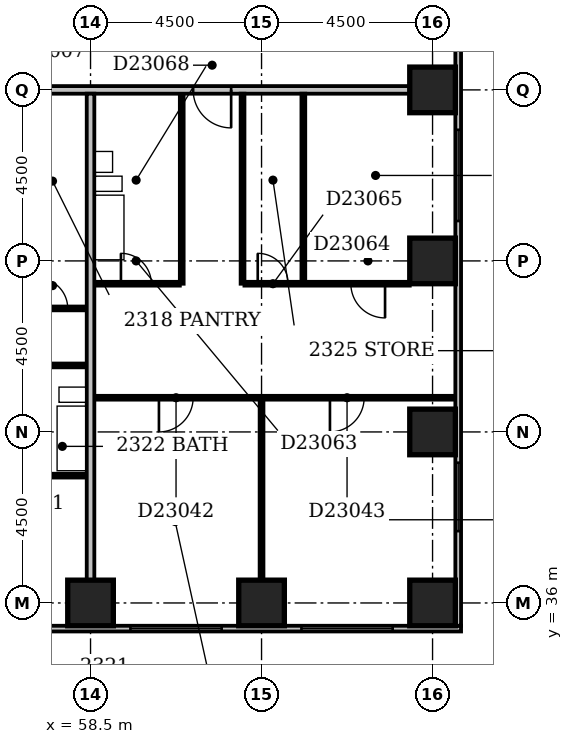
"""IFC4 building model, lengths in metres.
Left out: names, types, materials, properties, quantities, classifications, styles, units other than length and angle.
Written with IfcOpenShell. Run it as: python <this file> out.ifc"""

import sys

from ifc_helpers import new_model, si_unit, direction, frame, frame_2d, origin, origin_2d, place, context, subcontext, project, spatial, rectangle, extrude, element, fill, save


model = new_model("IFC4")
c1 = context("Model", 3, precision=1e-05, world=origin(), true_north=direction((0.0, 1.0)))
c2 = subcontext(c1, "Body", "Model", "MODEL_VIEW")
j1 = project(units=[si_unit("LENGTHUNIT", "METRE"), si_unit("PLANEANGLEUNIT", "RADIAN")], contexts=[c1])
p1 = place(None, origin())
s1 = spatial("IfcSite", under=j1, at=p1, CompositionType="ELEMENT")
p2 = place(p1, origin())
s2 = spatial("IfcBuilding", under=s1, at=p2, CompositionType="ELEMENT")
p3 = place(p2, frame((0.0, 0.0, 93.8)))
s3 = spatial("IfcBuildingStorey", under=s2, at=p3, CompositionType="ELEMENT", Elevation=93.8)
for number, where, z_axis, x_axis in (
    (1, (58.5, 36.0, -0.3), (0.0, 0.0, 1.0), (1.0, 0.0, 0.0)),
    (2, (63.0, 36.0, -0.3), (0.0, 0.0, 1.0), (1.0, 0.0, 0.0)),
    (3, (67.5, 36.0, -0.3), (0.0, 0.0, 1.0), (1.0, 0.0, 0.0)),
    (4, (67.5, 40.5, -0.3), (0.0, 0.0, 1.0), (1.0, 0.0, 0.0)),
    (5, (67.5, 45.0, -0.3), (0.0, 0.0, 1.0), (1.0, 0.0, 0.0)),
    (6, (67.5, 49.5, -0.3), (0.0, 0.0, 1.0), (1.0, 0.0, 0.0)),
):
    element("IfcColumn", number, at=place(p3, frame(where, z_axis=z_axis, x_axis=x_axis)), inside=s3, PredefinedType="COLUMN", context=c2, shape_type="SweptSolid", body=[
        extrude(rectangle(XDim=1.2, YDim=1.2, at=origin_2d()), origin(), (0.0, 0.0, 1.0), 3.6),
    ])
p4 = place(p3, frame((23.1, 35.325, 0.0), z_axis=(0.0, 0.0, 1.0), x_axis=(1.0, 0.0, 0.0)))
e7 = element("IfcWall", 7, at=p4, inside=s3, PredefinedType="STANDARD", context=c2, shape_type="SweptSolid", body=[
    extrude(rectangle(XDim=45.15, YDim=0.15, at=frame_2d((22.575, 0.0))), origin(), (0.0, 0.0, 1.0), 2.7),
])
p5 = place(p4, frame((2.185, 0.0, 0.6)))
e8 = element("IfcOpeningElement", 8, at=p5, cuts=e7, PredefinedType="OPENING", context=c2, shape_type="SweptSolid", body=[
    extrude(rectangle(XDim=0.9, YDim=1.8, at=frame_2d((0.45, 0.9))), frame((0.0, 0.087, 0.0), z_axis=(0.0, -1.0, 0.0), x_axis=(1.0, 0.0, 0.0)), (0.0, 0.0, 1.0), 0.174),
])
p6 = place(p4, frame((4.95, 0.0, 0.6)))
e9 = element("IfcOpeningElement", 9, at=p6, cuts=e7, PredefinedType="OPENING", context=c2, shape_type="SweptSolid", body=[
    extrude(rectangle(XDim=2.4, YDim=1.8, at=frame_2d((1.2, 0.9))), frame((0.0, 0.087, 0.0), z_axis=(0.0, -1.0, 0.0), x_axis=(1.0, 0.0, 0.0)), (0.0, 0.0, 1.0), 0.174),
])
p7 = place(p4, frame((9.45, 0.0, 0.6)))
e10 = element("IfcOpeningElement", 10, at=p7, cuts=e7, PredefinedType="OPENING", context=c2, shape_type="SweptSolid", body=[
    extrude(rectangle(XDim=2.4, YDim=1.8, at=frame_2d((1.2, 0.9))), frame((0.0, 0.087, 0.0), z_axis=(0.0, -1.0, 0.0), x_axis=(1.0, 0.0, 0.0)), (0.0, 0.0, 1.0), 0.174),
])
p8 = place(p4, frame((13.95, 0.0, 0.6)))
e11 = element("IfcOpeningElement", 11, at=p8, cuts=e7, PredefinedType="OPENING", context=c2, shape_type="SweptSolid", body=[
    extrude(rectangle(XDim=2.4, YDim=1.8, at=frame_2d((1.2, 0.9))), frame((0.0, 0.087, 0.0), z_axis=(0.0, -1.0, 0.0), x_axis=(1.0, 0.0, 0.0)), (0.0, 0.0, 1.0), 0.174),
])
p9 = place(p4, frame((18.45, 0.0, 0.6)))
e12 = element("IfcOpeningElement", 12, at=p9, cuts=e7, PredefinedType="OPENING", context=c2, shape_type="SweptSolid", body=[
    extrude(rectangle(XDim=2.4, YDim=1.8, at=frame_2d((1.2, 0.9))), frame((0.0, 0.087, 0.0), z_axis=(0.0, -1.0, 0.0), x_axis=(1.0, 0.0, 0.0)), (0.0, 0.0, 1.0), 0.174),
])
p10 = place(p4, frame((22.71, 0.0, 0.6)))
e13 = element("IfcOpeningElement", 13, at=p10, cuts=e7, PredefinedType="OPENING", context=c2, shape_type="SweptSolid", body=[
    extrude(rectangle(XDim=1.8, YDim=1.8, at=frame_2d((0.9, 0.9))), frame((0.0, 0.087, 0.0), z_axis=(0.0, -1.0, 0.0), x_axis=(1.0, 0.0, 0.0)), (0.0, 0.0, 1.0), 0.174),
])
p11 = place(p4, frame((28.859, 0.0, 0.6)))
e14 = element("IfcOpeningElement", 14, at=p11, cuts=e7, PredefinedType="OPENING", context=c2, shape_type="SweptSolid", body=[
    extrude(rectangle(XDim=1.2, YDim=1.8, at=frame_2d((0.6, 0.9))), frame((0.0, 0.087, 0.0), z_axis=(0.0, -1.0, 0.0), x_axis=(1.0, 0.0, 0.0)), (0.0, 0.0, 1.0), 0.174),
])
p12 = place(p4, frame((31.95, 0.0, 0.6)))
e15 = element("IfcOpeningElement", 15, at=p12, cuts=e7, PredefinedType="OPENING", context=c2, shape_type="SweptSolid", body=[
    extrude(rectangle(XDim=2.4, YDim=1.8, at=frame_2d((1.2, 0.9))), frame((0.0, 0.087, 0.0), z_axis=(0.0, -1.0, 0.0), x_axis=(1.0, 0.0, 0.0)), (0.0, 0.0, 1.0), 0.174),
])
p13 = place(p4, frame((36.45, 0.0, 0.6)))
e16 = element("IfcOpeningElement", 16, at=p13, cuts=e7, PredefinedType="OPENING", context=c2, shape_type="SweptSolid", body=[
    extrude(rectangle(XDim=2.4, YDim=1.8, at=frame_2d((1.2, 0.9))), frame((0.0, 0.087, 0.0), z_axis=(0.0, -1.0, 0.0), x_axis=(1.0, 0.0, 0.0)), (0.0, 0.0, 1.0), 0.174),
])
p14 = place(p4, frame((40.95, 0.0, 0.6)))
e17 = element("IfcOpeningElement", 17, at=p14, cuts=e7, PredefinedType="OPENING", context=c2, shape_type="SweptSolid", body=[
    extrude(rectangle(XDim=2.4, YDim=1.8, at=frame_2d((1.2, 0.9))), frame((0.0, 0.087, 0.0), z_axis=(0.0, -1.0, 0.0), x_axis=(1.0, 0.0, 0.0)), (0.0, 0.0, 1.0), 0.174),
])
p15 = place(p3, frame((68.175, 35.4, 0.0), z_axis=(0.0, 0.0, 1.0), x_axis=(0.0, 1.0, 0.0)))
e18 = element("IfcWall", 18, at=p15, inside=s3, PredefinedType="STANDARD", context=c2, shape_type="SweptSolid", body=[
    extrude(rectangle(XDim=23.85, YDim=0.15, at=frame_2d((11.925, 0.0))), origin(), (0.0, 0.0, 1.0), 2.7),
])
p16 = place(p15, frame((2.49, 0.0, 0.6)))
e19 = element("IfcOpeningElement", 19, at=p16, cuts=e18, PredefinedType="OPENING", context=c2, shape_type="SweptSolid", body=[
    extrude(rectangle(XDim=1.8, YDim=1.8, at=frame_2d((0.9, 0.9))), frame((0.0, 0.087, 0.0), z_axis=(0.0, -1.0, 0.0), x_axis=(1.0, 0.0, 0.0)), (0.0, 0.0, 1.0), 0.174),
])
p17 = place(p15, frame((10.65, 0.0, 0.6)))
e20 = element("IfcOpeningElement", 20, at=p17, cuts=e18, PredefinedType="OPENING", context=c2, shape_type="SweptSolid", body=[
    extrude(rectangle(XDim=2.4, YDim=1.8, at=frame_2d((1.2, 0.9))), frame((0.0, 0.087, 0.0), z_axis=(0.0, -1.0, 0.0), x_axis=(1.0, 0.0, 0.0)), (0.0, 0.0, 1.0), 0.174),
])
p18 = place(p15, frame((19.526, 0.0, 0.6)))
e21 = element("IfcOpeningElement", 21, at=p18, cuts=e18, PredefinedType="OPENING", context=c2, shape_type="SweptSolid", body=[
    extrude(rectangle(XDim=2.1, YDim=1.8, at=frame_2d((1.05, 0.9))), frame((0.0, 0.087, 0.0), z_axis=(0.0, -1.0, 0.0), x_axis=(1.0, 0.0, 0.0)), (0.0, 0.0, 1.0), 0.174),
])
p19 = place(p3, frame((58.5, 36.6, 0.0), z_axis=(0.0, 0.0, 1.0), x_axis=(0.0, 1.0, 0.0)))
e22 = element("IfcWall", 22, at=p19, inside=s3, PredefinedType="PARTITIONING", context=c2, shape_type="SweptSolid", body=[
    extrude(rectangle(XDim=12.8, YDim=0.2, at=frame_2d((6.4, 0.0))), origin(), (0.0, 0.0, 1.0), 3.3),
])
p20 = place(p3, frame((63.0, 36.6, 0.0), z_axis=(0.0, 0.0, 1.0), x_axis=(0.0, 1.0, 0.0)))
e23 = element("IfcWall", 23, at=p20, inside=s3, PredefinedType="PARTITIONING", context=c2, shape_type="SweptSolid", body=[
    extrude(rectangle(XDim=4.75, YDim=0.1, at=frame_2d((2.375, 0.0))), origin(), (0.0, 0.0, 1.0), 2.4),
])
p21 = place(p3, frame((56.25, 39.35, 0.0), z_axis=(0.0, 0.0, 1.0), x_axis=(1.0, 0.0, 0.0)))
e24 = element("IfcWall", 24, at=p21, inside=s3, PredefinedType="PLUMBINGWALL", context=c2, shape_type="SweptSolid", body=[
    extrude(rectangle(XDim=2.15, YDim=0.1, at=frame_2d((1.075, 0.0))), origin(), (0.0, 0.0, 1.0), 3.3),
])
p22 = place(p3, frame((58.6, 41.4, 0.0), z_axis=(0.0, 0.0, 1.0), x_axis=(1.0, 0.0, 0.0)))
e25 = element("IfcWall", 25, at=p22, inside=s3, PredefinedType="PARTITIONING", context=c2, shape_type="SweptSolid", body=[
    extrude(rectangle(XDim=9.5, YDim=0.1, at=frame_2d((4.75, 0.0))), origin(), (0.0, 0.0, 1.0), 3.3),
])
p23 = place(p22, frame((1.7, 0.0, 0.0)))
e26 = element("IfcOpeningElement", 26, at=p23, cuts=e25, PredefinedType="OPENING", context=c2, shape_type="SweptSolid", body=[
    extrude(rectangle(XDim=0.9, YDim=2.1, at=frame_2d((0.45, 1.05))), frame((0.0, 0.062, 0.0), z_axis=(0.0, -1.0, 0.0), x_axis=(1.0, 0.0, 0.0)), (0.0, 0.0, 1.0), 0.124),
])
p24 = place(p22, frame((6.2, 0.0, 0.0)))
e27 = element("IfcOpeningElement", 27, at=p24, cuts=e25, PredefinedType="OPENING", context=c2, shape_type="SweptSolid", body=[
    extrude(rectangle(XDim=0.9, YDim=2.1, at=frame_2d((0.45, 1.05))), frame((0.0, 0.062, 0.0), z_axis=(0.0, -1.0, 0.0), x_axis=(1.0, 0.0, 0.0)), (0.0, 0.0, 1.0), 0.124),
])
p25 = place(p3, frame((40.6, 42.25, 0.0), z_axis=(0.0, 0.0, 1.0), x_axis=(1.0, 0.0, 0.0)))
e28 = element("IfcWall", 28, at=p25, inside=s3, PredefinedType="PARTITIONING", context=c2, shape_type="SweptSolid", body=[
    extrude(rectangle(XDim=17.8, YDim=0.1, at=frame_2d((8.9, 0.0))), origin(), (0.0, 0.0, 1.0), 3.3),
])
p26 = place(p25, frame((3.9, 0.0, 0.0)))
e29 = element("IfcOpeningElement", 29, at=p26, cuts=e28, PredefinedType="OPENING", context=c2, shape_type="SweptSolid", body=[
    extrude(rectangle(XDim=0.9, YDim=2.1, at=frame_2d((0.45, 1.05))), frame((0.0, 0.062, 0.0), z_axis=(0.0, -1.0, 0.0), x_axis=(1.0, 0.0, 0.0)), (0.0, 0.0, 1.0), 0.124),
])
p27 = place(p25, frame((10.7, 0.0, 0.0)))
e30 = element("IfcOpeningElement", 30, at=p27, cuts=e28, PredefinedType="OPENING", context=c2, shape_type="SweptSolid", body=[
    extrude(rectangle(XDim=0.9, YDim=2.1, at=frame_2d((0.45, 1.05))), frame((0.0, 0.062, 0.0), z_axis=(0.0, -1.0, 0.0), x_axis=(1.0, 0.0, 0.0)), (0.0, 0.0, 1.0), 0.124),
])
p28 = place(p25, frame((14.05, 0.0, 0.0)))
e31 = element("IfcOpeningElement", 31, at=p28, cuts=e28, PredefinedType="OPENING", context=c2, shape_type="SweptSolid", body=[
    extrude(rectangle(XDim=0.9, YDim=2.1, at=frame_2d((0.45, 1.05))), frame((0.0, 0.062, 0.0), z_axis=(0.0, -1.0, 0.0), x_axis=(1.0, 0.0, 0.0)), (0.0, 0.0, 1.0), 0.124),
])
p29 = place(p3, frame((49.05, 43.75, 0.0), z_axis=(0.0, 0.0, 1.0), x_axis=(1.0, 0.0, 0.0)))
e32 = element("IfcWall", 32, at=p29, inside=s3, PredefinedType="PARTITIONING", context=c2, shape_type="SweptSolid", body=[
    extrude(rectangle(XDim=9.35, YDim=0.1, at=frame_2d((4.675, 0.0))), origin(), (0.0, 0.0, 1.0), 3.3),
])
p30 = place(p29, frame((0.75, 0.0, 0.0)))
e33 = element("IfcOpeningElement", 33, at=p30, cuts=e32, PredefinedType="OPENING", context=c2, shape_type="SweptSolid", body=[
    extrude(rectangle(XDim=0.8, YDim=2.1, at=frame_2d((0.4, 1.05))), frame((0.0, 0.062, 0.0), z_axis=(0.0, -1.0, 0.0), x_axis=(1.0, 0.0, 0.0)), (0.0, 0.0, 1.0), 0.124),
])
p31 = place(p29, frame((8.05, 0.0, 0.0)))
e34 = element("IfcOpeningElement", 34, at=p31, cuts=e32, PredefinedType="OPENING", context=c2, shape_type="SweptSolid", body=[
    extrude(rectangle(XDim=0.8, YDim=2.1, at=frame_2d((0.4, 1.05))), frame((0.0, 0.062, 0.0), z_axis=(0.0, -1.0, 0.0), x_axis=(1.0, 0.0, 0.0)), (0.0, 0.0, 1.0), 0.124),
])
p32 = place(p29, frame((4.25, 0.0, 0.0)))
e35 = element("IfcOpeningElement", 35, at=p32, cuts=e32, PredefinedType="OPENING", context=c2, shape_type="SweptSolid", body=[
    extrude(rectangle(XDim=0.8, YDim=2.1, at=frame_2d((0.4, 1.05))), frame((0.0, 0.062, 0.0), z_axis=(0.0, -1.0, 0.0), x_axis=(1.0, 0.0, 0.0)), (0.0, 0.0, 1.0), 0.124),
])
p33 = place(p29, frame((6.05, 0.0, 0.0)))
e36 = element("IfcOpeningElement", 36, at=p33, cuts=e32, PredefinedType="OPENING", context=c2, shape_type="SweptSolid", body=[
    extrude(rectangle(XDim=0.8, YDim=2.1, at=frame_2d((0.4, 1.05))), frame((0.0, 0.062, 0.0), z_axis=(0.0, -1.0, 0.0), x_axis=(1.0, 0.0, 0.0)), (0.0, 0.0, 1.0), 0.124),
])
p34 = place(p29, frame((2.7, 0.0, 0.0)))
e37 = element("IfcOpeningElement", 37, at=p34, cuts=e32, PredefinedType="OPENING", context=c2, shape_type="SweptSolid", body=[
    extrude(rectangle(XDim=0.8, YDim=2.1, at=frame_2d((0.4, 1.05))), frame((0.0, 0.062, 0.0), z_axis=(0.0, -1.0, 0.0), x_axis=(1.0, 0.0, 0.0)), (0.0, 0.0, 1.0), 0.124),
])
p35 = place(p3, frame((58.6, 44.4, 0.0), z_axis=(0.0, 0.0, 1.0), x_axis=(1.0, 0.0, 0.0)))
e38 = element("IfcWall", 38, at=p35, inside=s3, PredefinedType="PARTITIONING", context=c2, shape_type="SweptSolid", body=[
    extrude(rectangle(XDim=2.25, YDim=0.1, at=frame_2d((1.125, 0.0))), origin(), (0.0, 0.0, 1.0), 3.3),
])
p36 = place(p35, frame((0.7, 0.0, 0.0)))
e39 = element("IfcOpeningElement", 39, at=p36, cuts=e38, PredefinedType="OPENING", context=c2, shape_type="SweptSolid", body=[
    extrude(rectangle(XDim=0.8, YDim=2.1, at=frame_2d((0.4, 1.05))), frame((0.0, 0.062, 0.0), z_axis=(0.0, -1.0, 0.0), x_axis=(1.0, 0.0, 0.0)), (0.0, 0.0, 1.0), 0.124),
])
p37 = place(p3, frame((60.9, 44.4, 0.0), z_axis=(0.0, 0.0, 1.0), x_axis=(0.0, 1.0, 0.0)))
e40 = element("IfcWall", 40, at=p37, inside=s3, PredefinedType="PLUMBINGWALL", context=c2, shape_type="SweptSolid", body=[
    extrude(rectangle(XDim=5.0, YDim=0.1, at=frame_2d((2.5, 0.0))), origin(), (0.0, 0.0, 1.0), 3.3),
])
p38 = place(p3, frame((62.5, 44.4, 0.0), z_axis=(0.0, 0.0, 1.0), x_axis=(0.0, 1.0, 0.0)))
e41 = element("IfcWall", 41, at=p38, inside=s3, PredefinedType="PARTITIONING", context=c2, shape_type="SweptSolid", body=[
    extrude(rectangle(XDim=5.0, YDim=0.1, at=frame_2d((2.5, 0.0))), origin(), (0.0, 0.0, 1.0), 2.4),
])
p39 = place(p3, frame((62.55, 44.4, 0.0), z_axis=(0.0, 0.0, 1.0), x_axis=(1.0, 0.0, 0.0)))
e42 = element("IfcWall", 42, at=p39, inside=s3, PredefinedType="PARTITIONING", context=c2, shape_type="SweptSolid", body=[
    extrude(rectangle(XDim=4.35, YDim=0.1, at=frame_2d((2.175, 0.0))), origin(), (0.0, 0.0, 1.0), 3.3),
])
p40 = place(p39, frame((2.8, 0.0, 0.0)))
e43 = element("IfcOpeningElement", 43, at=p40, cuts=e42, PredefinedType="OPENING", context=c2, shape_type="SweptSolid", body=[
    extrude(rectangle(XDim=0.9, YDim=2.1, at=frame_2d((0.45, 1.05))), frame((0.0, 0.062, 0.0), z_axis=(0.0, -1.0, 0.0), x_axis=(1.0, 0.0, 0.0)), (0.0, 0.0, 1.0), 0.124),
])
p41 = place(p39, frame((0.35, 0.0, 0.0)))
e44 = element("IfcOpeningElement", 44, at=p41, cuts=e42, PredefinedType="OPENING", context=c2, shape_type="SweptSolid", body=[
    extrude(rectangle(XDim=0.8, YDim=2.1, at=frame_2d((0.4, 1.05))), frame((0.0, 0.062, 0.0), z_axis=(0.0, -1.0, 0.0), x_axis=(1.0, 0.0, 0.0)), (0.0, 0.0, 1.0), 0.124),
])
p42 = place(p3, frame((64.1, 44.45, 0.0), z_axis=(0.0, 0.0, 1.0), x_axis=(0.0, 1.0, 0.0)))
e45 = element("IfcWall", 45, at=p42, inside=s3, PredefinedType="PARTITIONING", context=c2, shape_type="SweptSolid", body=[
    extrude(rectangle(XDim=4.95, YDim=0.1, at=frame_2d((2.475, 0.0))), origin(), (0.0, 0.0, 1.0), 3.3),
])
p43 = place(p3, frame((9.1, 49.5, 0.0), z_axis=(0.0, 0.0, 1.0), x_axis=(1.0, 0.0, 0.0)))
e46 = element("IfcWall", 46, at=p43, inside=s3, PredefinedType="PARTITIONING", context=c2, shape_type="SweptSolid", body=[
    extrude(rectangle(XDim=57.8, YDim=0.2, at=frame_2d((28.9, 0.0))), origin(), (0.0, 0.0, 1.0), 3.3),
])
p44 = place(p43, frame((13.7, 0.0, 0.0)))
e47 = element("IfcOpeningElement", 47, at=p44, cuts=e46, PredefinedType="OPENING", context=c2, shape_type="SweptSolid", body=[
    extrude(rectangle(XDim=1.0, YDim=2.1, at=frame_2d((0.5, 1.05))), frame((0.0, 0.112, 0.0), z_axis=(0.0, -1.0, 0.0), x_axis=(1.0, 0.0, 0.0)), (0.0, 0.0, 1.0), 0.224),
])
p45 = place(p43, frame((38.6, 0.0, 0.0)))
e48 = element("IfcOpeningElement", 48, at=p45, cuts=e46, PredefinedType="OPENING", context=c2, shape_type="SweptSolid", body=[
    extrude(rectangle(XDim=1.0, YDim=2.1, at=frame_2d((0.5, 1.05))), frame((0.0, 0.112, 0.0), z_axis=(0.0, -1.0, 0.0), x_axis=(1.0, 0.0, 0.0)), (0.0, 0.0, 1.0), 0.224),
])
p46 = place(p43, frame((52.1, 0.0, 0.0)))
e49 = element("IfcOpeningElement", 49, at=p46, cuts=e46, PredefinedType="OPENING", context=c2, shape_type="SweptSolid", body=[
    extrude(rectangle(XDim=1.0, YDim=2.1, at=frame_2d((0.5, 1.05))), frame((0.0, 0.112, 0.0), z_axis=(0.0, -1.0, 0.0), x_axis=(1.0, 0.0, 0.0)), (0.0, 0.0, 1.0), 0.224),
])
p47 = place(p43, frame((6.15, 0.0, 0.0)))
e50 = element("IfcOpeningElement", 50, at=p47, cuts=e46, PredefinedType="OPENING", context=c2, shape_type="SweptSolid", body=[
    extrude(rectangle(XDim=0.9, YDim=2.1, at=frame_2d((0.45, 1.05))), frame((0.0, 0.112, 0.0), z_axis=(0.0, -1.0, 0.0), x_axis=(1.0, 0.0, 0.0)), (0.0, 0.0, 1.0), 0.224),
])
p48 = place(p43, frame((10.65, 0.0, 0.0)))
e51 = element("IfcOpeningElement", 51, at=p48, cuts=e46, PredefinedType="OPENING", context=c2, shape_type="SweptSolid", body=[
    extrude(rectangle(XDim=0.9, YDim=2.1, at=frame_2d((0.45, 1.05))), frame((0.0, 0.112, 0.0), z_axis=(0.0, -1.0, 0.0), x_axis=(1.0, 0.0, 0.0)), (0.0, 0.0, 1.0), 0.224),
])
p49 = place(p13, origin())
e52 = element("IfcWindow", 52, at=p49, inside=s3, PartitioningType="SINGLE_PANEL", PredefinedType="WINDOW", context=c2, shape_type="SweptSolid", body=[
    extrude(rectangle(XDim=2.4, YDim=1.8, at=frame_2d((1.2, 0.9))), frame((0.0, 0.03, 0.0), z_axis=(0.0, -1.0, 0.0), x_axis=(1.0, 0.0, 0.0)), (0.0, 0.0, 1.0), 0.06),
])
fill(e16, e52)
p50 = place(p14, origin())
e53 = element("IfcWindow", 53, at=p50, inside=s3, PartitioningType="SINGLE_PANEL", PredefinedType="WINDOW", context=c2, shape_type="SweptSolid", body=[
    extrude(rectangle(XDim=2.4, YDim=1.8, at=frame_2d((1.2, 0.9))), frame((0.0, 0.03, 0.0), z_axis=(0.0, -1.0, 0.0), x_axis=(1.0, 0.0, 0.0)), (0.0, 0.0, 1.0), 0.06),
])
fill(e17, e53)
p51 = place(p16, origin())
e54 = element("IfcWindow", 54, at=p51, inside=s3, PartitioningType="SINGLE_PANEL", PredefinedType="WINDOW", context=c2, shape_type="SweptSolid", body=[
    extrude(rectangle(XDim=1.8, YDim=1.8, at=frame_2d((0.9, 0.9))), frame((0.0, 0.03, 0.0), z_axis=(0.0, -1.0, 0.0), x_axis=(1.0, 0.0, 0.0)), (0.0, 0.0, 1.0), 0.06),
])
fill(e19, e54)
p52 = place(p17, origin())
e55 = element("IfcWindow", 55, at=p52, inside=s3, PartitioningType="SINGLE_PANEL", PredefinedType="WINDOW", context=c2, shape_type="SweptSolid", body=[
    extrude(rectangle(XDim=2.4, YDim=1.8, at=frame_2d((1.2, 0.9))), frame((0.0, 0.03, 0.0), z_axis=(0.0, -1.0, 0.0), x_axis=(1.0, 0.0, 0.0)), (0.0, 0.0, 1.0), 0.06),
])
fill(e20, e55)
p53 = place(p23, frame((0.9, 0.0, 0.0), z_axis=(0.0, 0.0, 1.0), x_axis=(-1.0, 0.0, 0.0)))
e56 = element("IfcDoor", 56, at=p53, inside=s3, OperationType="SINGLE_SWING_RIGHT", PredefinedType="DOOR", context=c2, shape_type="SweptSolid", body=[
    extrude(rectangle(XDim=0.9, YDim=2.1, at=frame_2d((0.45, 1.05))), frame((0.0, 0.025, 0.0), z_axis=(0.0, -1.0, 0.0), x_axis=(1.0, 0.0, 0.0)), (0.0, 0.0, 1.0), 0.05),
])
fill(e26, e56)
p54 = place(p24, frame((0.9, 0.0, 0.0), z_axis=(0.0, 0.0, 1.0), x_axis=(-1.0, 0.0, 0.0)))
e57 = element("IfcDoor", 57, at=p54, inside=s3, OperationType="SINGLE_SWING_RIGHT", PredefinedType="DOOR", context=c2, shape_type="SweptSolid", body=[
    extrude(rectangle(XDim=0.9, YDim=2.1, at=frame_2d((0.45, 1.05))), frame((0.0, 0.025, 0.0), z_axis=(0.0, -1.0, 0.0), x_axis=(1.0, 0.0, 0.0)), (0.0, 0.0, 1.0), 0.05),
])
fill(e27, e57)
p55 = place(p31, origin())
e58 = element("IfcDoor", 58, at=p55, inside=s3, OperationType="SINGLE_SWING_LEFT", PredefinedType="DOOR", context=c2, shape_type="SweptSolid", body=[
    extrude(rectangle(XDim=0.8, YDim=2.1, at=frame_2d((0.4, 1.05))), frame((0.0, 0.025, 0.0), z_axis=(0.0, -1.0, 0.0), x_axis=(1.0, 0.0, 0.0)), (0.0, 0.0, 1.0), 0.05),
])
fill(e34, e58)
p56 = place(p36, origin())
e59 = element("IfcDoor", 59, at=p56, inside=s3, OperationType="SINGLE_SWING_LEFT", PredefinedType="DOOR", context=c2, shape_type="SweptSolid", body=[
    extrude(rectangle(XDim=0.8, YDim=2.1, at=frame_2d((0.4, 1.05))), frame((0.0, 0.025, 0.0), z_axis=(0.0, -1.0, 0.0), x_axis=(1.0, 0.0, 0.0)), (0.0, 0.0, 1.0), 0.05),
])
fill(e39, e59)
p57 = place(p40, origin())
e60 = element("IfcDoor", 60, at=p57, inside=s3, OperationType="SINGLE_SWING_RIGHT", PredefinedType="DOOR", context=c2, shape_type="SweptSolid", body=[
    extrude(rectangle(XDim=0.9, YDim=2.1, at=frame_2d((0.45, 1.05))), frame((0.0, 0.025, 0.0), z_axis=(0.0, -1.0, 0.0), x_axis=(1.0, 0.0, 0.0)), (0.0, 0.0, 1.0), 0.05),
])
fill(e43, e60)
p58 = place(p41, origin())
e61 = element("IfcDoor", 61, at=p58, inside=s3, OperationType="SINGLE_SWING_LEFT", PredefinedType="DOOR", context=c2, shape_type="SweptSolid", body=[
    extrude(rectangle(XDim=0.8, YDim=2.1, at=frame_2d((0.4, 1.05))), frame((0.0, 0.025, 0.0), z_axis=(0.0, -1.0, 0.0), x_axis=(1.0, 0.0, 0.0)), (0.0, 0.0, 1.0), 0.05),
])
fill(e44, e61)
p59 = place(p46, origin())
e62 = element("IfcDoor", 62, at=p59, inside=s3, OperationType="SINGLE_SWING_RIGHT", PredefinedType="DOOR", context=c2, shape_type="SweptSolid", body=[
    extrude(rectangle(XDim=1.0, YDim=2.1, at=frame_2d((0.5, 1.05))), frame((0.0, 0.025, 0.0), z_axis=(0.0, -1.0, 0.0), x_axis=(1.0, 0.0, 0.0)), (0.0, 0.0, 1.0), 0.05),
])
fill(e49, e62)
save(model, sys.argv[1])
